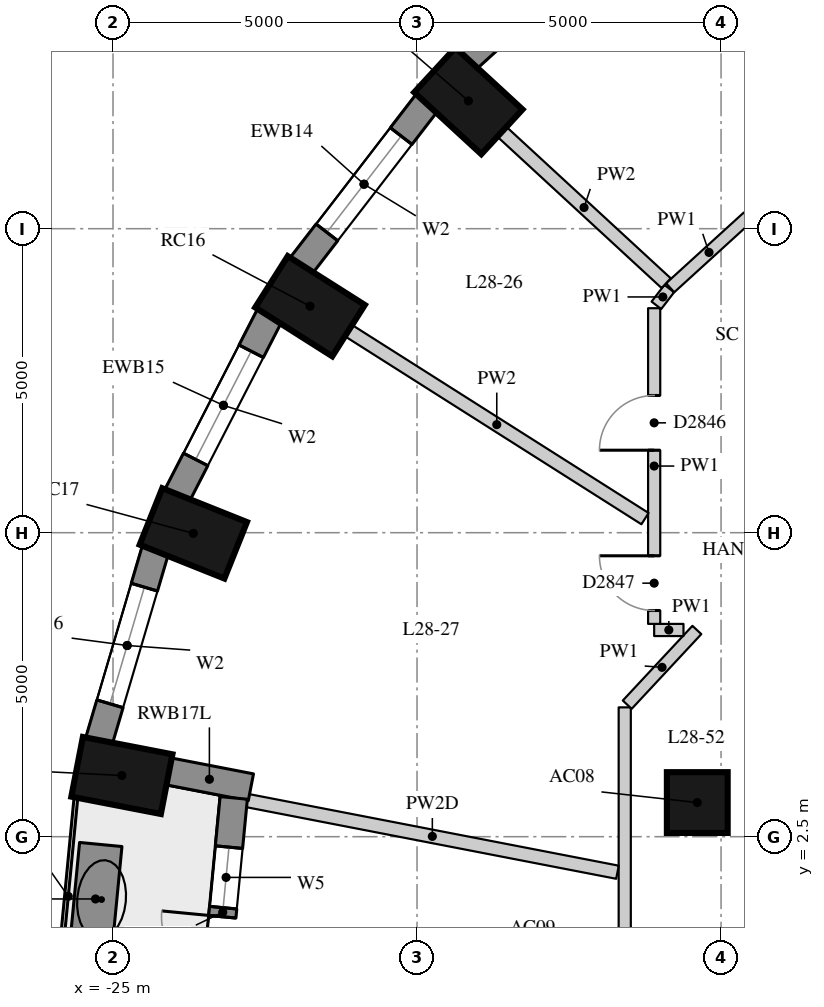
"""IFC4 building model, lengths in metres.
Left out: names, types, materials, properties, quantities, classifications, styles, units other than length and angle.
Written with IfcOpenShell. Run it as: python <this file> out.ifc"""

import sys

from ifc_helpers import new_model, si_unit, direction, frame, frame_2d, origin, origin_2d, place, context, subcontext, project, spatial, rectangle, extrude, element, fill, save


model = new_model("IFC4")
c1 = context("Model", 3, precision=1e-05, world=origin(), true_north=direction((0.0, 1.0)))
c2 = subcontext(c1, "Body", "Model", "MODEL_VIEW")
j1 = project(units=[si_unit("LENGTHUNIT", "METRE"), si_unit("PLANEANGLEUNIT", "RADIAN")], contexts=[c1])
p1 = place(None, origin())
s1 = spatial("IfcSite", under=j1, at=p1, CompositionType="ELEMENT")
p2 = place(p1, origin())
s2 = spatial("IfcBuilding", under=s1, at=p2, CompositionType="ELEMENT")
p3 = place(p2, frame((0.0, 0.0, 102.1)))
s3 = spatial("IfcBuildingStorey", under=s2, at=p3, CompositionType="ELEMENT", Elevation=102.1)
for number, where, z_axis, x_axis in (
    (1, (-19.156, 14.602, 0.0), (0.0, 0.0, 1.0), (-0.735, 0.678, 0.0)),
    (2, (-21.76, 11.225, 0.0), (0.0, 0.0, 1.0), (-0.845, 0.536, 0.0)),
    (3, (-23.679, 7.489, 0.0), (0.0, 0.0, 1.0), (-0.929, 0.371, 0.0)),
    (4, (-24.854, 3.507, 0.0), (0.0, 0.0, 1.0), (-0.982, 0.19, 0.0)),
):
    element("IfcColumn", number, at=place(p3, frame(where, z_axis=z_axis, x_axis=x_axis)), inside=s3, PredefinedType="COLUMN", context=c2, shape_type="SweptSolid", body=[
        extrude(rectangle(XDim=1.5, YDim=1.0, at=origin_2d()), origin(), (0.0, 0.0, 1.0), 3.3),
    ])
p4 = place(p3, frame((-15.391, 3.062, 0.0), z_axis=(0.0, 0.0, 1.0), x_axis=(1.0, 0.0, 0.0)))
e5 = element("IfcColumn", 5, at=p4, inside=s3, PredefinedType="COLUMN", context=c2, shape_type="SweptSolid", body=[
    extrude(rectangle(XDim=1.0, YDim=1.0, at=origin_2d()), origin(), (0.0, 0.0, 1.0), 3.3),
])
p5 = place(p3, frame((-16.62, 17.61, 0.0), z_axis=(0.0, 0.0, 1.0), x_axis=(-0.74032902847, -0.672244694739, 0.0)))
e6 = element("IfcWall", 6, at=p5, inside=s3, PredefinedType="SOLIDWALL", context=c2, shape_type="SweptSolid", body=[
    extrude(rectangle(XDim=3.464, YDim=0.45, at=frame_2d((1.732, 0.0))), origin(), (0.0, 0.0, 1.0), 3.02),
])
p6 = place(p5, frame((0.732, 0.0, 0.4)))
e7 = element("IfcOpeningElement", 7, at=p6, cuts=e6, PredefinedType="OPENING", context=c2, shape_type="SweptSolid", body=[
    extrude(rectangle(XDim=2.0, YDim=1.75, at=frame_2d((1.0, 0.875))), frame((0.0, 0.235, 0.0), z_axis=(0.0, -1.0, 0.0), x_axis=(1.0, 0.0, 0.0)), (0.0, 0.0, 1.0), 0.47),
])
p7 = place(p3, frame((-19.835, 14.575, 0.0), z_axis=(0.0, 0.0, 1.0), x_axis=(-0.610693945156, -0.791866721961, 0.0)))
e8 = element("IfcWall", 8, at=p7, inside=s3, PredefinedType="SOLIDWALL", context=c2, shape_type="SweptSolid", body=[
    extrude(rectangle(XDim=3.395, YDim=0.45, at=frame_2d((1.697, 0.0))), origin(), (0.0, 0.0, 1.0), 3.02),
])
p8 = place(p7, frame((0.697, 0.0, 0.4)))
e9 = element("IfcOpeningElement", 9, at=p8, cuts=e8, PredefinedType="OPENING", context=c2, shape_type="SweptSolid", body=[
    extrude(rectangle(XDim=2.0, YDim=1.75, at=frame_2d((1.0, 0.875))), frame((0.0, 0.235, 0.0), z_axis=(0.0, -1.0, 0.0), x_axis=(1.0, 0.0, 0.0)), (0.0, 0.0, 1.0), 0.47),
])
p9 = place(p3, frame((-22.423, 11.077, 0.0), z_axis=(0.0, 0.0, 1.0), x_axis=(-0.456828186229, -0.889554949549, 0.0)))
e10 = element("IfcWall", 10, at=p9, inside=s3, PredefinedType="SOLIDWALL", context=c2, shape_type="SweptSolid", body=[
    extrude(rectangle(XDim=3.333, YDim=0.45, at=frame_2d((1.667, 0.0))), origin(), (0.0, 0.0, 1.0), 3.02),
])
p10 = place(p9, frame((0.666, 0.0, 0.4)))
e11 = element("IfcOpeningElement", 11, at=p10, cuts=e10, PredefinedType="OPENING", context=c2, shape_type="SweptSolid", body=[
    extrude(rectangle(XDim=2.0, YDim=1.75, at=frame_2d((1.0, 0.875))), frame((0.0, 0.235, 0.0), z_axis=(0.0, -1.0, 0.0), x_axis=(1.0, 0.0, 0.0)), (0.0, 0.0, 1.0), 0.47),
])
p11 = place(p3, frame((-24.302, 7.221, 0.0), z_axis=(0.0, 0.0, 1.0), x_axis=(-0.283071248438, -0.959098883488, 0.0)))
e12 = element("IfcWall", 12, at=p11, inside=s3, PredefinedType="SOLIDWALL", context=c2, shape_type="SweptSolid", body=[
    extrude(rectangle(XDim=3.286, YDim=0.45, at=frame_2d((1.643, 0.0))), origin(), (0.0, 0.0, 1.0), 3.02),
])
p12 = place(p11, frame((0.643, 0.0, 0.4)))
e13 = element("IfcOpeningElement", 13, at=p12, cuts=e12, PredefinedType="OPENING", context=c2, shape_type="SweptSolid", body=[
    extrude(rectangle(XDim=2.0, YDim=1.75, at=frame_2d((1.0, 0.875))), frame((0.0, 0.235, 0.0), z_axis=(0.0, -1.0, 0.0), x_axis=(1.0, 0.0, 0.0)), (0.0, 0.0, 1.0), 0.47),
])
p13 = place(p3, frame((-24.097, 3.576, 0.0), z_axis=(0.0, 0.0, 1.0), x_axis=(0.981777736615, -0.190032828447, 0.0)))
e14 = element("IfcWall", 14, at=p13, inside=s3, PredefinedType="SOLIDWALL", context=c2, shape_type="SweptSolid", body=[
    extrude(rectangle(XDim=1.39, YDim=0.45, at=frame_2d((0.695, 0.0))), origin(), (0.0, 0.0, 1.0), 2.47),
])
p14 = place(p3, frame((-23.015, 3.138, 0.0), z_axis=(0.0, 0.0, 1.0), x_axis=(-0.095675452713, -0.995412581671, 0.0)))
e15 = element("IfcWall", 15, at=p14, inside=s3, PredefinedType="SOLIDWALL", context=c2, shape_type="SweptSolid", body=[
    extrude(rectangle(XDim=3.777, YDim=0.45, at=frame_2d((1.888, 0.0))), origin(), (0.0, 0.0, 1.0), 3.02),
])
p15 = place(p14, frame((0.813, 0.0, 0.4)))
e16 = element("IfcOpeningElement", 16, at=p15, cuts=e15, PredefinedType="OPENING", context=c2, shape_type="SweptSolid", body=[
    extrude(rectangle(XDim=1.0, YDim=1.75, at=frame_2d((0.5, 0.875))), frame((0.0, 0.235, 0.0), z_axis=(0.0, -1.0, 0.0), x_axis=(1.0, 0.0, 0.0)), (0.0, 0.0, 1.0), 0.47),
])
p16 = place(p14, frame((1.963, 0.0, 0.0)))
e17 = element("IfcOpeningElement", 17, at=p16, cuts=e15, PredefinedType="OPENING", context=c2, shape_type="SweptSolid", body=[
    extrude(rectangle(XDim=1.0, YDim=2.15, at=frame_2d((0.5, 1.075))), frame((0.0, 0.235, 0.0), z_axis=(0.0, -1.0, 0.0), x_axis=(1.0, 0.0, 0.0)), (0.0, 0.0, 1.0), 0.47),
])
p17 = place(p3, frame((-25.201, 2.372, 0.0), z_axis=(0.0, 0.0, 1.0), x_axis=(-0.0959036751, -0.995390619356, 0.0)))
e18 = element("IfcWall", 18, at=p17, inside=s3, PredefinedType="USERDEFINED", context=c2, shape_type="SweptSolid", body=[
    extrude(rectangle(XDim=1.8, YDim=0.7, at=frame_2d((0.9, 0.0))), origin(), (0.0, 0.0, 1.0), 0.75),
])
p18 = place(p3, frame((-16.584, -5.727, 0.0), z_axis=(0.0, 0.0, 1.0), x_axis=(0.0, 1.0, 0.0)))
e19 = element("IfcWall", 19, at=p18, inside=s3, PredefinedType="PARTITIONING", context=c2, shape_type="SweptSolid", body=[
    extrude(rectangle(XDim=10.354, YDim=0.2, at=frame_2d((5.177, 0.0))), origin(), (0.0, 0.0, 1.0), 3.02),
])
p19 = place(p18, frame((3.439, 0.0, 0.0)))
e20 = element("IfcOpeningElement", 20, at=p19, cuts=e19, PredefinedType="OPENING", context=c2, shape_type="SweptSolid", body=[
    extrude(rectangle(XDim=1.1, YDim=2.1, at=frame_2d((0.55, 1.05))), frame((0.0, 0.11, 0.0), z_axis=(0.0, -1.0, 0.0), x_axis=(1.0, 0.0, 0.0)), (0.0, 0.0, 1.0), 0.22),
])
p20 = place(p3, frame((-16.543, 4.671, 0.0), z_axis=(0.0, 0.0, 1.0), x_axis=(0.681815766934, 0.731523929861, 0.0)))
e21 = element("IfcWall", 21, at=p20, inside=s3, PredefinedType="PARTITIONING", context=c2, shape_type="SweptSolid", body=[
    extrude(rectangle(XDim=1.68, YDim=0.2, at=frame_2d((0.84, 0.0))), origin(), (0.0, 0.0, 1.0), 3.02),
])
p21 = place(p3, frame((-15.618, 5.9, 0.0), z_axis=(0.0, 0.0, 1.0), x_axis=(-1.0, 0.0, 0.0)))
e22 = element("IfcWall", 22, at=p21, inside=s3, PredefinedType="PARTITIONING", context=c2, shape_type="SweptSolid", body=[
    extrude(rectangle(XDim=0.482, YDim=0.2, at=frame_2d((0.241, 0.0))), origin(), (0.0, 0.0, 1.0), 3.02),
])
p22 = place(p3, frame((-16.1, 6.0, 0.0), z_axis=(0.0, 0.0, 1.0), x_axis=(0.0, 1.0, 0.0)))
e23 = element("IfcWall", 23, at=p22, inside=s3, PredefinedType="PARTITIONING", context=c2, shape_type="SweptSolid", body=[
    extrude(rectangle(XDim=5.192, YDim=0.2, at=frame_2d((2.596, 0.0))), origin(), (0.0, 0.0, 1.0), 3.02),
])
p23 = place(p22, frame((2.857, 0.0, 0.0)))
e24 = element("IfcOpeningElement", 24, at=p23, cuts=e23, PredefinedType="OPENING", context=c2, shape_type="SweptSolid", body=[
    extrude(rectangle(XDim=0.9, YDim=2.1, at=frame_2d((0.45, 1.05))), frame((0.0, 0.11, 0.0), z_axis=(0.0, -1.0, 0.0), x_axis=(1.0, 0.0, 0.0)), (0.0, 0.0, 1.0), 0.22),
])
p24 = place(p22, frame((0.22, 0.0, 0.0)))
e25 = element("IfcOpeningElement", 25, at=p24, cuts=e23, PredefinedType="OPENING", context=c2, shape_type="SweptSolid", body=[
    extrude(rectangle(XDim=0.9, YDim=2.1, at=frame_2d((0.45, 1.05))), frame((0.0, 0.11, 0.0), z_axis=(0.0, -1.0, 0.0), x_axis=(1.0, 0.0, 0.0)), (0.0, 0.0, 1.0), 0.22),
])
p25 = place(p3, frame((-16.063, 11.24, 0.0), z_axis=(0.0, 0.0, 1.0), x_axis=(0.609744747854, 0.792597844096, 0.0)))
e26 = element("IfcWall", 26, at=p25, inside=s3, PredefinedType="PARTITIONING", context=c2, shape_type="SweptSolid", body=[
    extrude(rectangle(XDim=0.347, YDim=0.2, at=frame_2d((0.174, 0.0))), origin(), (0.0, 0.0, 1.0), 3.02),
])
p26 = place(p3, frame((-15.837, 11.528, 0.0), z_axis=(0.0, 0.0, 1.0), x_axis=(0.739402681643, 0.673263450946, 0.0)))
e27 = element("IfcWall", 27, at=p26, inside=s3, PredefinedType="PARTITIONING", context=c2, shape_type="SweptSolid", body=[
    extrude(rectangle(XDim=1.728, YDim=0.2, at=frame_2d((0.864, 0.0))), origin(), (0.0, 0.0, 1.0), 3.02),
])
p27 = place(p3, frame((-18.604, 14.094, 0.0), z_axis=(0.0, 0.0, 1.0), x_axis=(0.73529495628, -0.677747244383, 0.0)))
e28 = element("IfcWall", 28, at=p27, inside=s3, PredefinedType="PARTITIONING", context=c2, shape_type="SweptSolid", body=[
    extrude(rectangle(XDim=3.674, YDim=0.22, at=frame_2d((1.837, 0.0))), origin(), (0.0, 0.0, 1.0), 3.02),
])
p28 = place(p3, frame((-21.126, 10.823, 0.0), z_axis=(0.0, 0.0, 1.0), x_axis=(0.844518840625, -0.535525842355, 0.0)))
e29 = element("IfcWall", 29, at=p28, inside=s3, PredefinedType="PARTITIONING", context=c2, shape_type="SweptSolid", body=[
    extrude(rectangle(XDim=5.773, YDim=0.22, at=frame_2d((2.887, 0.0))), origin(), (0.0, 0.0, 1.0), 3.02),
])
p29 = place(p3, frame((-22.793, 3.095, 0.0), z_axis=(0.0, 0.0, 1.0), x_axis=(0.98175994641, -0.190124715976, 0.0)))
e30 = element("IfcWall", 30, at=p29, inside=s3, PredefinedType="PARTITIONING", context=c2, shape_type="SweptSolid", body=[
    extrude(rectangle(XDim=6.202, YDim=0.22, at=frame_2d((3.101, 0.0))), origin(), (0.0, 0.0, 1.0), 2.47),
])
p30 = place(p8, origin())
e31 = element("IfcWindow", 31, at=p30, inside=s3, PartitioningType="SINGLE_PANEL", PredefinedType="WINDOW", context=c2, shape_type="SweptSolid", body=[
    extrude(rectangle(XDim=2.0, YDim=1.75, at=frame_2d((1.0, 0.875))), frame((0.0, 0.035, 0.0), z_axis=(0.0, -1.0, 0.0), x_axis=(1.0, 0.0, 0.0)), (0.0, 0.0, 1.0), 0.06),
])
fill(e9, e31)
p31 = place(p10, origin())
e32 = element("IfcWindow", 32, at=p31, inside=s3, PartitioningType="SINGLE_PANEL", PredefinedType="WINDOW", context=c2, shape_type="SweptSolid", body=[
    extrude(rectangle(XDim=2.0, YDim=1.75, at=frame_2d((1.0, 0.875))), frame((0.0, 0.035, 0.0), z_axis=(0.0, -1.0, 0.0), x_axis=(1.0, 0.0, 0.0)), (0.0, 0.0, 1.0), 0.06),
])
fill(e11, e32)
p32 = place(p12, origin())
e33 = element("IfcWindow", 33, at=p32, inside=s3, PartitioningType="SINGLE_PANEL", PredefinedType="WINDOW", context=c2, shape_type="SweptSolid", body=[
    extrude(rectangle(XDim=2.0, YDim=1.75, at=frame_2d((1.0, 0.875))), frame((0.0, 0.035, 0.0), z_axis=(0.0, -1.0, 0.0), x_axis=(1.0, 0.0, 0.0)), (0.0, 0.0, 1.0), 0.06),
])
fill(e13, e33)
p33 = place(p15, origin())
e34 = element("IfcWindow", 34, at=p33, inside=s3, PartitioningType="SINGLE_PANEL", PredefinedType="WINDOW", context=c2, shape_type="SweptSolid", body=[
    extrude(rectangle(XDim=1.0, YDim=1.75, at=frame_2d((0.5, 0.875))), frame((0.0, 0.035, 0.0), z_axis=(0.0, -1.0, 0.0), x_axis=(1.0, 0.0, 0.0)), (0.0, 0.0, 1.0), 0.06),
])
fill(e16, e34)
p34 = place(p16, frame((1.0, 0.0, 0.0), z_axis=(0.0, 0.0, 1.0), x_axis=(-1.0, 0.0, 0.0)))
e35 = element("IfcDoor", 35, at=p34, inside=s3, OperationType="SINGLE_SWING_RIGHT", PredefinedType="DOOR", context=c2, shape_type="SweptSolid", body=[
    extrude(rectangle(XDim=1.0, YDim=2.15, at=frame_2d((0.5, 1.075))), frame((0.0, 0.075, 0.0), z_axis=(0.0, -1.0, 0.0), x_axis=(1.0, 0.0, 0.0)), (0.0, 0.0, 1.0), 0.05),
])
fill(e17, e35)
p35 = place(p23, origin())
e36 = element("IfcDoor", 36, at=p35, inside=s3, OperationType="SINGLE_SWING_LEFT", PredefinedType="DOOR", context=c2, shape_type="SweptSolid", body=[
    extrude(rectangle(XDim=0.9, YDim=2.1, at=frame_2d((0.45, 1.05))), frame((0.0, 0.025, 0.0), z_axis=(0.0, -1.0, 0.0), x_axis=(1.0, 0.0, 0.0)), (0.0, 0.0, 1.0), 0.05),
])
fill(e24, e36)
p36 = place(p24, origin())
e37 = element("IfcDoor", 37, at=p36, inside=s3, OperationType="SINGLE_SWING_RIGHT", PredefinedType="DOOR", context=c2, shape_type="SweptSolid", body=[
    extrude(rectangle(XDim=0.9, YDim=2.1, at=frame_2d((0.45, 1.05))), frame((0.0, 0.025, 0.0), z_axis=(0.0, -1.0, 0.0), x_axis=(1.0, 0.0, 0.0)), (0.0, 0.0, 1.0), 0.05),
])
fill(e25, e37)
save(model, sys.argv[1])
